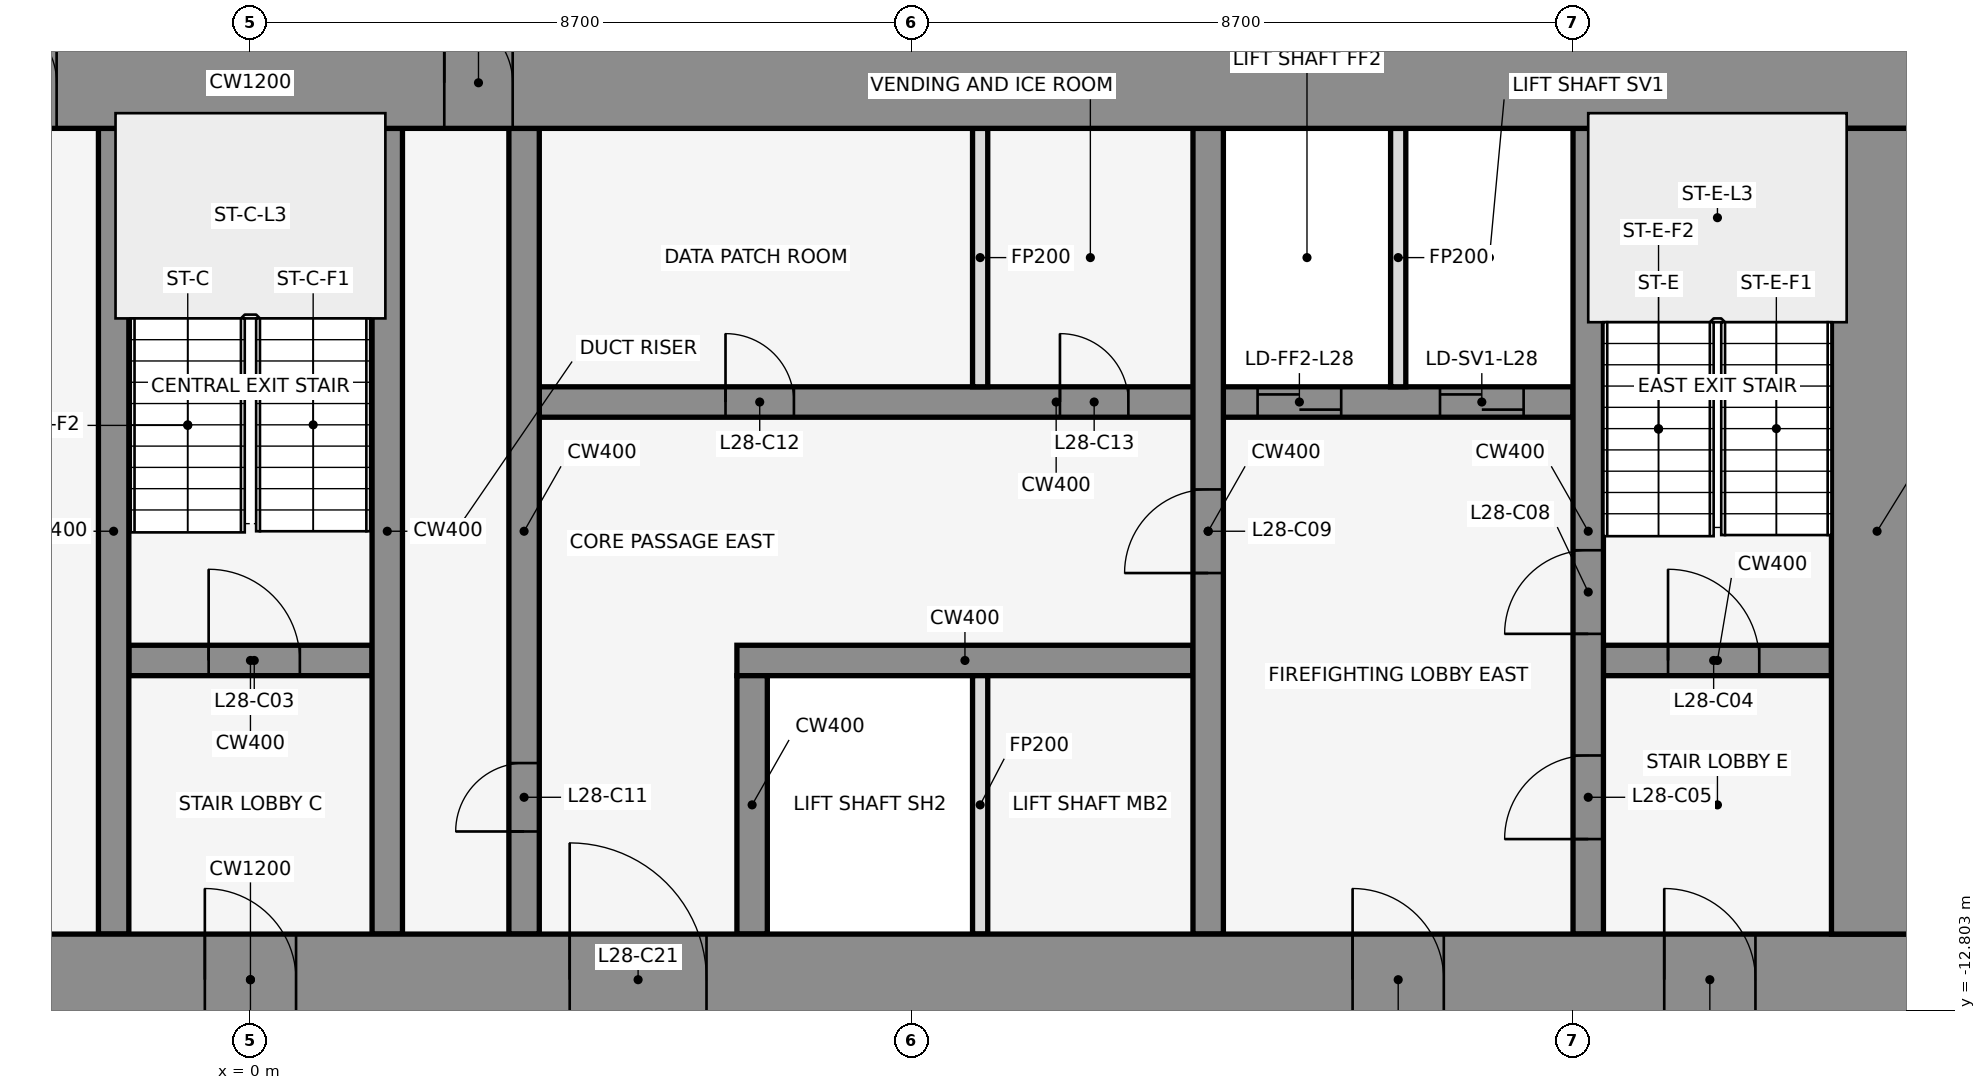
"""IFC4 building model, lengths in metres.
Left out: names, types, materials, properties, quantities, classifications, styles, units other than length and angle.
Written with IfcOpenShell. Run it as: python <this file> out.ifc"""

import sys

from ifc_helpers import new_model, si_unit, direction, frame, frame_2d, origin, place, context, subcontext, project, spatial, rectangle, extrude, element, fill, save


model = new_model("IFC4")
c1 = context("Model", 3, precision=1e-05, world=origin(), true_north=direction((0.0, 1.0)))
c2 = subcontext(c1, "Body", "Model", "MODEL_VIEW")
j1 = project(units=[si_unit("LENGTHUNIT", "METRE"), si_unit("PLANEANGLEUNIT", "RADIAN")], contexts=[c1])
p1 = place(None, origin())
s1 = spatial("IfcSite", under=j1, at=p1, CompositionType="ELEMENT")
p2 = place(p1, origin())
s2 = spatial("IfcBuilding", under=s1, at=p2, CompositionType="ELEMENT")
p3 = place(p2, frame((0.0, 0.0, 130.9)))
s3 = spatial("IfcBuildingStorey", under=s2, at=p3, CompositionType="ELEMENT", Elevation=130.9)
for number, where, z_axis, x_axis in (
    (1, (16.432, -0.105, 0.0), (0.0, 0.0, 1.0), (-0.84, 0.543, 0.0)),
    (2, (1.901, 1.08, 0.0), (0.0, 0.0, 1.0), (-0.84, -0.543, 0.0)),
    (3, (-0.068, -0.105, 0.0), (0.0, 0.0, 1.0), (-0.84, 0.543, 0.0)),
):
    element("IfcWall", number, at=place(p3, frame(where, z_axis=z_axis, x_axis=x_axis)), inside=s3, PredefinedType="STANDARD", context=c2, shape_type="SweptSolid", body=[
        extrude(rectangle(XDim=2.183, YDim=0.25, at=frame_2d((1.091, 0.0))), origin(), (0.0, 0.0, 1.0), 3.9),
    ])
p4 = place(p3, frame((-1.6, -8.2, 0.0), z_axis=(0.0, 0.0, 1.0), x_axis=(1.0, 0.0, 0.0)))
e4 = element("IfcWall", 4, at=p4, inside=s3, PredefinedType="SHEAR", context=c2, shape_type="SweptSolid", body=[
    extrude(rectangle(XDim=3.2, YDim=0.4, at=frame_2d((1.6, 0.0))), origin(), (0.0, 0.0, 1.0), 4.1),
])
p5 = place(p4, frame((1.05, 0.0, 0.0)))
e5 = element("IfcOpeningElement", 5, at=p5, cuts=e4, PredefinedType="OPENING", context=c2, shape_type="SweptSolid", body=[
    extrude(rectangle(XDim=1.2, YDim=2.1, at=frame_2d((0.6, 1.05))), frame((0.0, 0.212, 0.0), z_axis=(0.0, -1.0, 0.0), x_axis=(1.0, 0.0, 0.0)), (0.0, 0.0, 1.0), 0.424),
])
p6 = place(p3, frame((6.4, -8.2, 0.0), z_axis=(0.0, 0.0, 1.0), x_axis=(1.0, 0.0, 0.0)))
e6 = element("IfcWall", 6, at=p6, inside=s3, PredefinedType="SHEAR", context=c2, shape_type="SweptSolid", body=[
    extrude(rectangle(XDim=6.0, YDim=0.4, at=frame_2d((3.0, 0.0))), origin(), (0.0, 0.0, 1.0), 4.1),
])
p7 = place(p3, frame((17.8, -8.2, 0.0), z_axis=(0.0, 0.0, 1.0), x_axis=(1.0, 0.0, 0.0)))
e7 = element("IfcWall", 7, at=p7, inside=s3, PredefinedType="SHEAR", context=c2, shape_type="SweptSolid", body=[
    extrude(rectangle(XDim=3.0, YDim=0.4, at=frame_2d((1.5, 0.0))), origin(), (0.0, 0.0, 1.0), 4.1),
])
p8 = place(p7, frame((0.85, 0.0, 0.0)))
e8 = element("IfcOpeningElement", 8, at=p8, cuts=e7, PredefinedType="OPENING", context=c2, shape_type="SweptSolid", body=[
    extrude(rectangle(XDim=1.2, YDim=2.1, at=frame_2d((0.6, 1.05))), frame((0.0, 0.212, 0.0), z_axis=(0.0, -1.0, 0.0), x_axis=(1.0, 0.0, 0.0)), (0.0, 0.0, 1.0), 0.424),
])
p9 = place(p3, frame((3.8, -4.8, 0.0), z_axis=(0.0, 0.0, 1.0), x_axis=(1.0, 0.0, 0.0)))
e9 = element("IfcWall", 9, at=p9, inside=s3, PredefinedType="SHEAR", context=c2, shape_type="SweptSolid", body=[
    extrude(rectangle(XDim=13.6, YDim=0.4, at=frame_2d((6.8, 0.0))), origin(), (0.0, 0.0, 1.0), 4.1),
])
p10 = place(p9, frame((9.45, 0.0, 0.0)))
e10 = element("IfcOpeningElement", 10, at=p10, cuts=e9, PredefinedType="OPENING", context=c2, shape_type="SweptSolid", body=[
    extrude(rectangle(XDim=1.1, YDim=2.1, at=frame_2d((0.55, 1.05))), frame((0.0, 0.212, 0.0), z_axis=(0.0, -1.0, 0.0), x_axis=(1.0, 0.0, 0.0)), (0.0, 0.0, 1.0), 0.424),
])
p11 = place(p9, frame((11.85, 0.0, 0.0)))
e11 = element("IfcOpeningElement", 11, at=p11, cuts=e9, PredefinedType="OPENING", context=c2, shape_type="SweptSolid", body=[
    extrude(rectangle(XDim=1.1, YDim=2.1, at=frame_2d((0.55, 1.05))), frame((0.0, 0.212, 0.0), z_axis=(0.0, -1.0, 0.0), x_axis=(1.0, 0.0, 0.0)), (0.0, 0.0, 1.0), 0.424),
])
p12 = place(p9, frame((2.45, 0.0, 0.0)))
e12 = element("IfcOpeningElement", 12, at=p12, cuts=e9, PredefinedType="OPENING", context=c2, shape_type="SweptSolid", body=[
    extrude(rectangle(XDim=0.9, YDim=2.1, at=frame_2d((0.45, 1.05))), frame((0.0, 0.212, 0.0), z_axis=(0.0, -1.0, 0.0), x_axis=(1.0, 0.0, 0.0)), (0.0, 0.0, 1.0), 0.424),
])
p13 = place(p9, frame((6.85, 0.0, 0.0)))
e13 = element("IfcOpeningElement", 13, at=p13, cuts=e9, PredefinedType="OPENING", context=c2, shape_type="SweptSolid", body=[
    extrude(rectangle(XDim=0.9, YDim=2.1, at=frame_2d((0.45, 1.05))), frame((0.0, 0.212, 0.0), z_axis=(0.0, -1.0, 0.0), x_axis=(1.0, 0.0, 0.0)), (0.0, 0.0, 1.0), 0.424),
])
for number, where, z_axis, x_axis in (
    (14, (-1.8, -11.8, 0.0), (0.0, 0.0, 1.0), (0.0, 1.0, 0.0)),
    (15, (1.8, -11.8, 0.0), (0.0, 0.0, 1.0), (0.0, 1.0, 0.0)),
):
    element("IfcWall", number, at=place(p3, frame(where, z_axis=z_axis, x_axis=x_axis)), inside=s3, PredefinedType="SHEAR", context=c2, shape_type="SweptSolid", body=[
        extrude(rectangle(XDim=10.6, YDim=0.4, at=frame_2d((5.3, 0.0))), origin(), (0.0, 0.0, 1.0), 4.1),
    ])
p14 = place(p3, frame((3.6, -11.8, 0.0), z_axis=(0.0, 0.0, 1.0), x_axis=(0.0, 1.0, 0.0)))
e16 = element("IfcWall", 16, at=p14, inside=s3, PredefinedType="SHEAR", context=c2, shape_type="SweptSolid", body=[
    extrude(rectangle(XDim=10.6, YDim=0.4, at=frame_2d((5.3, 0.0))), origin(), (0.0, 0.0, 1.0), 4.1),
])
p15 = place(p14, frame((1.35, 0.0, 0.0)))
e17 = element("IfcOpeningElement", 17, at=p15, cuts=e16, PredefinedType="OPENING", context=c2, shape_type="SweptSolid", body=[
    extrude(rectangle(XDim=0.9, YDim=2.1, at=frame_2d((0.45, 1.05))), frame((0.0, 0.212, 0.0), z_axis=(0.0, -1.0, 0.0), x_axis=(1.0, 0.0, 0.0)), (0.0, 0.0, 1.0), 0.424),
])
p16 = place(p3, frame((6.6, -11.8, 0.0), z_axis=(0.0, 0.0, 1.0), x_axis=(0.0, 1.0, 0.0)))
e18 = element("IfcWall", 18, at=p16, inside=s3, PredefinedType="SHEAR", context=c2, shape_type="SweptSolid", body=[
    extrude(rectangle(XDim=3.4, YDim=0.4, at=frame_2d((1.7, 0.0))), origin(), (0.0, 0.0, 1.0), 4.1),
])
for number, where, z_axis, x_axis in (
    (19, (9.6, -11.8, 0.0), (0.0, 0.0, 1.0), (0.0, 1.0, 0.0)),
    (20, (9.6, -4.6, 0.0), (0.0, 0.0, 1.0), (0.0, 1.0, 0.0)),
):
    element("IfcWall", number, at=place(p3, frame(where, z_axis=z_axis, x_axis=x_axis)), inside=s3, PredefinedType="PARTITIONING", context=c2, shape_type="SweptSolid", body=[
        extrude(rectangle(XDim=3.4, YDim=0.2, at=frame_2d((1.7, 0.0))), origin(), (0.0, 0.0, 1.0), 2.968),
    ])
p17 = place(p3, frame((12.6, -11.8, 0.0), z_axis=(0.0, 0.0, 1.0), x_axis=(0.0, 1.0, 0.0)))
e21 = element("IfcWall", 21, at=p17, inside=s3, PredefinedType="SHEAR", context=c2, shape_type="SweptSolid", body=[
    extrude(rectangle(XDim=10.6, YDim=0.4, at=frame_2d((5.3, 0.0))), origin(), (0.0, 0.0, 1.0), 4.1),
])
p18 = place(p17, frame((4.75, 0.0, 0.0)))
e22 = element("IfcOpeningElement", 22, at=p18, cuts=e21, PredefinedType="OPENING", context=c2, shape_type="SweptSolid", body=[
    extrude(rectangle(XDim=1.1, YDim=2.1, at=frame_2d((0.55, 1.05))), frame((0.0, 0.212, 0.0), z_axis=(0.0, -1.0, 0.0), x_axis=(1.0, 0.0, 0.0)), (0.0, 0.0, 1.0), 0.424),
])
p19 = place(p3, frame((15.1, -4.6, 0.0), z_axis=(0.0, 0.0, 1.0), x_axis=(0.0, 1.0, 0.0)))
e23 = element("IfcWall", 23, at=p19, inside=s3, PredefinedType="PARTITIONING", context=c2, shape_type="SweptSolid", body=[
    extrude(rectangle(XDim=3.4, YDim=0.2, at=frame_2d((1.7, 0.0))), origin(), (0.0, 0.0, 1.0), 2.968),
])
p20 = place(p3, frame((17.6, -11.8, 0.0), z_axis=(0.0, 0.0, 1.0), x_axis=(0.0, 1.0, 0.0)))
e24 = element("IfcWall", 24, at=p20, inside=s3, PredefinedType="SHEAR", context=c2, shape_type="SweptSolid", body=[
    extrude(rectangle(XDim=10.6, YDim=0.4, at=frame_2d((5.3, 0.0))), origin(), (0.0, 0.0, 1.0), 4.1),
])
p21 = place(p20, frame((1.25, 0.0, 0.0)))
e25 = element("IfcOpeningElement", 25, at=p21, cuts=e24, PredefinedType="OPENING", context=c2, shape_type="SweptSolid", body=[
    extrude(rectangle(XDim=1.1, YDim=2.1, at=frame_2d((0.55, 1.05))), frame((0.0, 0.212, 0.0), z_axis=(0.0, -1.0, 0.0), x_axis=(1.0, 0.0, 0.0)), (0.0, 0.0, 1.0), 0.424),
])
p22 = place(p20, frame((3.95, 0.0, 0.0)))
e26 = element("IfcOpeningElement", 26, at=p22, cuts=e24, PredefinedType="OPENING", context=c2, shape_type="SweptSolid", body=[
    extrude(rectangle(XDim=1.1, YDim=2.1, at=frame_2d((0.55, 1.05))), frame((0.0, 0.212, 0.0), z_axis=(0.0, -1.0, 0.0), x_axis=(1.0, 0.0, 0.0)), (0.0, 0.0, 1.0), 0.424),
])
p23 = place(p3, frame((-22.0, -0.6, 0.0), z_axis=(0.0, 0.0, 1.0), x_axis=(1.0, 0.0, 0.0)))
e27 = element("IfcWall", 27, at=p23, inside=s3, PredefinedType="SHEAR", context=c2, shape_type="SweptSolid", body=[
    extrude(rectangle(XDim=44.0, YDim=1.2, at=frame_2d((22.0, 0.0))), origin(), (0.0, 0.0, 1.0), 4.1),
])
p24 = place(p23, frame((18.55, 0.0, 0.0)))
e28 = element("IfcOpeningElement", 28, at=p24, cuts=e27, PredefinedType="OPENING", context=c2, shape_type="SweptSolid", body=[
    extrude(rectangle(XDim=0.9, YDim=2.1, at=frame_2d((0.45, 1.05))), frame((0.0, 0.612, 0.0), z_axis=(0.0, -1.0, 0.0), x_axis=(1.0, 0.0, 0.0)), (0.0, 0.0, 1.0), 1.224),
])
p25 = place(p23, frame((24.55, 0.0, 0.0)))
e29 = element("IfcOpeningElement", 29, at=p25, cuts=e27, PredefinedType="OPENING", context=c2, shape_type="SweptSolid", body=[
    extrude(rectangle(XDim=0.9, YDim=2.1, at=frame_2d((0.45, 1.05))), frame((0.0, 0.612, 0.0), z_axis=(0.0, -1.0, 0.0), x_axis=(1.0, 0.0, 0.0)), (0.0, 0.0, 1.0), 1.224),
])
p26 = place(p3, frame((-22.0, -12.4, 0.0), z_axis=(0.0, 0.0, 1.0), x_axis=(1.0, 0.0, 0.0)))
e30 = element("IfcWall", 30, at=p26, inside=s3, PredefinedType="SHEAR", context=c2, shape_type="SweptSolid", body=[
    extrude(rectangle(XDim=44.0, YDim=1.2, at=frame_2d((22.0, 0.0))), origin(), (0.0, 0.0, 1.0), 4.1),
])
p27 = place(p26, frame((2.2, 0.0, 0.0)))
e31 = element("IfcOpeningElement", 31, at=p27, cuts=e30, PredefinedType="OPENING", context=c2, shape_type="SweptSolid", body=[
    extrude(rectangle(XDim=1.2, YDim=2.1, at=frame_2d((0.6, 1.05))), frame((0.0, 0.612, 0.0), z_axis=(0.0, -1.0, 0.0), x_axis=(1.0, 0.0, 0.0)), (0.0, 0.0, 1.0), 1.224),
])
p28 = place(p26, frame((21.4, 0.0, 0.0)))
e32 = element("IfcOpeningElement", 32, at=p28, cuts=e30, PredefinedType="OPENING", context=c2, shape_type="SweptSolid", body=[
    extrude(rectangle(XDim=1.2, YDim=2.1, at=frame_2d((0.6, 1.05))), frame((0.0, 0.612, 0.0), z_axis=(0.0, -1.0, 0.0), x_axis=(1.0, 0.0, 0.0)), (0.0, 0.0, 1.0), 1.224),
])
p29 = place(p26, frame((40.6, 0.0, 0.0)))
e33 = element("IfcOpeningElement", 33, at=p29, cuts=e30, PredefinedType="OPENING", context=c2, shape_type="SweptSolid", body=[
    extrude(rectangle(XDim=1.2, YDim=2.1, at=frame_2d((0.6, 1.05))), frame((0.0, 0.612, 0.0), z_axis=(0.0, -1.0, 0.0), x_axis=(1.0, 0.0, 0.0)), (0.0, 0.0, 1.0), 1.224),
])
p30 = place(p26, frame((16.0, 0.0, 0.0)))
e34 = element("IfcOpeningElement", 34, at=p30, cuts=e30, PredefinedType="OPENING", context=c2, shape_type="SweptSolid", body=[
    extrude(rectangle(XDim=1.8, YDim=2.1, at=frame_2d((0.9, 1.05))), frame((0.0, 0.612, 0.0), z_axis=(0.0, -1.0, 0.0), x_axis=(1.0, 0.0, 0.0)), (0.0, 0.0, 1.0), 1.224),
])
p31 = place(p26, frame((6.3, 0.0, 0.0)))
e35 = element("IfcOpeningElement", 35, at=p31, cuts=e30, PredefinedType="OPENING", context=c2, shape_type="SweptSolid", body=[
    extrude(rectangle(XDim=1.2, YDim=2.1, at=frame_2d((0.6, 1.05))), frame((0.0, 0.612, 0.0), z_axis=(0.0, -1.0, 0.0), x_axis=(1.0, 0.0, 0.0)), (0.0, 0.0, 1.0), 1.224),
])
p32 = place(p26, frame((26.2, 0.0, 0.0)))
e36 = element("IfcOpeningElement", 36, at=p32, cuts=e30, PredefinedType="OPENING", context=c2, shape_type="SweptSolid", body=[
    extrude(rectangle(XDim=1.8, YDim=2.1, at=frame_2d((0.9, 1.05))), frame((0.0, 0.612, 0.0), z_axis=(0.0, -1.0, 0.0), x_axis=(1.0, 0.0, 0.0)), (0.0, 0.0, 1.0), 1.224),
])
p33 = place(p26, frame((36.5, 0.0, 0.0)))
e37 = element("IfcOpeningElement", 37, at=p33, cuts=e30, PredefinedType="OPENING", context=c2, shape_type="SweptSolid", body=[
    extrude(rectangle(XDim=1.2, YDim=2.1, at=frame_2d((0.6, 1.05))), frame((0.0, 0.612, 0.0), z_axis=(0.0, -1.0, 0.0), x_axis=(1.0, 0.0, 0.0)), (0.0, 0.0, 1.0), 1.224),
])
p34 = place(p3, frame((21.4, -11.8, 0.0), z_axis=(0.0, 0.0, 1.0), x_axis=(0.0, 1.0, 0.0)))
e38 = element("IfcWall", 38, at=p34, inside=s3, PredefinedType="SHEAR", context=c2, shape_type="SweptSolid", body=[
    extrude(rectangle(XDim=10.6, YDim=1.2, at=frame_2d((5.3, 0.0))), origin(), (0.0, 0.0, 1.0), 4.1),
])
p35 = place(p5, origin())
e39 = element("IfcDoor", 39, at=p35, inside=s3, OperationType="SINGLE_SWING_LEFT", PredefinedType="DOOR", context=c2, shape_type="SweptSolid", body=[
    extrude(rectangle(XDim=1.2, YDim=2.1, at=frame_2d((0.6, 1.05))), frame((0.0, 0.025, 0.0), z_axis=(0.0, -1.0, 0.0), x_axis=(1.0, 0.0, 0.0)), (0.0, 0.0, 1.0), 0.05),
])
fill(e5, e39)
p36 = place(p8, origin())
e40 = element("IfcDoor", 40, at=p36, inside=s3, OperationType="SINGLE_SWING_RIGHT", PredefinedType="DOOR", context=c2, shape_type="SweptSolid", body=[
    extrude(rectangle(XDim=1.2, YDim=2.1, at=frame_2d((0.6, 1.05))), frame((0.0, 0.025, 0.0), z_axis=(0.0, -1.0, 0.0), x_axis=(1.0, 0.0, 0.0)), (0.0, 0.0, 1.0), 0.05),
])
fill(e8, e40)
p37 = place(p21, origin())
e41 = element("IfcDoor", 41, at=p37, inside=s3, OperationType="SINGLE_SWING_LEFT", PredefinedType="DOOR", context=c2, shape_type="SweptSolid", body=[
    extrude(rectangle(XDim=1.1, YDim=2.1, at=frame_2d((0.55, 1.05))), frame((0.0, 0.025, 0.0), z_axis=(0.0, -1.0, 0.0), x_axis=(1.0, 0.0, 0.0)), (0.0, 0.0, 1.0), 0.05),
])
fill(e25, e41)
p38 = place(p10, origin())
e42 = element("IfcDoor", 42, at=p38, inside=s3, OperationType="DOUBLE_DOOR_SLIDING", PredefinedType="DOOR", context=c2, shape_type="SweptSolid", body=[
    extrude(rectangle(XDim=1.1, YDim=2.1, at=frame_2d((0.55, 1.05))), frame((0.0, 0.025, 0.0), z_axis=(0.0, -1.0, 0.0), x_axis=(1.0, 0.0, 0.0)), (0.0, 0.0, 1.0), 0.05),
])
fill(e10, e42)
p39 = place(p11, origin())
e43 = element("IfcDoor", 43, at=p39, inside=s3, OperationType="DOUBLE_DOOR_SLIDING", PredefinedType="DOOR", context=c2, shape_type="SweptSolid", body=[
    extrude(rectangle(XDim=1.1, YDim=2.1, at=frame_2d((0.55, 1.05))), frame((0.0, 0.025, 0.0), z_axis=(0.0, -1.0, 0.0), x_axis=(1.0, 0.0, 0.0)), (0.0, 0.0, 1.0), 0.05),
])
fill(e11, e43)
p40 = place(p22, origin())
e44 = element("IfcDoor", 44, at=p40, inside=s3, OperationType="SINGLE_SWING_RIGHT", PredefinedType="DOOR", context=c2, shape_type="SweptSolid", body=[
    extrude(rectangle(XDim=1.1, YDim=2.1, at=frame_2d((0.55, 1.05))), frame((0.0, 0.025, 0.0), z_axis=(0.0, -1.0, 0.0), x_axis=(1.0, 0.0, 0.0)), (0.0, 0.0, 1.0), 0.05),
])
fill(e26, e44)
p41 = place(p18, frame((1.1, 0.0, 0.0), z_axis=(0.0, 0.0, 1.0), x_axis=(-1.0, 0.0, 0.0)))
e45 = element("IfcDoor", 45, at=p41, inside=s3, OperationType="SINGLE_SWING_RIGHT", PredefinedType="DOOR", context=c2, shape_type="SweptSolid", body=[
    extrude(rectangle(XDim=1.1, YDim=2.1, at=frame_2d((0.55, 1.05))), frame((0.0, 0.025, 0.0), z_axis=(0.0, -1.0, 0.0), x_axis=(1.0, 0.0, 0.0)), (0.0, 0.0, 1.0), 0.05),
])
fill(e22, e45)
p42 = place(p15, origin())
e46 = element("IfcDoor", 46, at=p42, inside=s3, OperationType="SINGLE_SWING_LEFT", PredefinedType="DOOR", context=c2, shape_type="SweptSolid", body=[
    extrude(rectangle(XDim=0.9, YDim=2.1, at=frame_2d((0.45, 1.05))), frame((0.0, 0.025, 0.0), z_axis=(0.0, -1.0, 0.0), x_axis=(1.0, 0.0, 0.0)), (0.0, 0.0, 1.0), 0.05),
])
fill(e17, e46)
p43 = place(p12, origin())
e47 = element("IfcDoor", 47, at=p43, inside=s3, OperationType="SINGLE_SWING_RIGHT", PredefinedType="DOOR", context=c2, shape_type="SweptSolid", body=[
    extrude(rectangle(XDim=0.9, YDim=2.1, at=frame_2d((0.45, 1.05))), frame((0.0, 0.025, 0.0), z_axis=(0.0, -1.0, 0.0), x_axis=(1.0, 0.0, 0.0)), (0.0, 0.0, 1.0), 0.05),
])
fill(e12, e47)
p44 = place(p13, origin())
e48 = element("IfcDoor", 48, at=p44, inside=s3, OperationType="SINGLE_SWING_LEFT", PredefinedType="DOOR", context=c2, shape_type="SweptSolid", body=[
    extrude(rectangle(XDim=0.9, YDim=2.1, at=frame_2d((0.45, 1.05))), frame((0.0, 0.025, 0.0), z_axis=(0.0, -1.0, 0.0), x_axis=(1.0, 0.0, 0.0)), (0.0, 0.0, 1.0), 0.05),
])
fill(e13, e48)
p45 = place(p24, origin())
e49 = element("IfcDoor", 49, at=p45, inside=s3, OperationType="SINGLE_SWING_LEFT", PredefinedType="DOOR", context=c2, shape_type="SweptSolid", body=[
    extrude(rectangle(XDim=0.9, YDim=2.1, at=frame_2d((0.45, 1.05))), frame((0.0, 0.025, 0.0), z_axis=(0.0, -1.0, 0.0), x_axis=(1.0, 0.0, 0.0)), (0.0, 0.0, 1.0), 0.05),
])
fill(e28, e49)
p46 = place(p25, origin())
e50 = element("IfcDoor", 50, at=p46, inside=s3, OperationType="SINGLE_SWING_LEFT", PredefinedType="DOOR", context=c2, shape_type="SweptSolid", body=[
    extrude(rectangle(XDim=0.9, YDim=2.1, at=frame_2d((0.45, 1.05))), frame((0.0, 0.025, 0.0), z_axis=(0.0, -1.0, 0.0), x_axis=(1.0, 0.0, 0.0)), (0.0, 0.0, 1.0), 0.05),
])
fill(e29, e50)
p47 = place(p28, frame((1.2, 0.0, 0.0), z_axis=(0.0, 0.0, 1.0), x_axis=(-1.0, 0.0, 0.0)))
e51 = element("IfcDoor", 51, at=p47, inside=s3, OperationType="SINGLE_SWING_RIGHT", PredefinedType="DOOR", context=c2, shape_type="SweptSolid", body=[
    extrude(rectangle(XDim=1.2, YDim=2.1, at=frame_2d((0.6, 1.05))), frame((0.0, 0.025, 0.0), z_axis=(0.0, -1.0, 0.0), x_axis=(1.0, 0.0, 0.0)), (0.0, 0.0, 1.0), 0.05),
])
fill(e32, e51)
p48 = place(p29, frame((1.2, 0.0, 0.0), z_axis=(0.0, 0.0, 1.0), x_axis=(-1.0, 0.0, 0.0)))
e52 = element("IfcDoor", 52, at=p48, inside=s3, OperationType="SINGLE_SWING_RIGHT", PredefinedType="DOOR", context=c2, shape_type="SweptSolid", body=[
    extrude(rectangle(XDim=1.2, YDim=2.1, at=frame_2d((0.6, 1.05))), frame((0.0, 0.025, 0.0), z_axis=(0.0, -1.0, 0.0), x_axis=(1.0, 0.0, 0.0)), (0.0, 0.0, 1.0), 0.05),
])
fill(e33, e52)
p49 = place(p32, origin())
e53 = element("IfcDoor", 53, at=p49, inside=s3, OperationType="SINGLE_SWING_LEFT", PredefinedType="DOOR", context=c2, shape_type="SweptSolid", body=[
    extrude(rectangle(XDim=1.8, YDim=2.1, at=frame_2d((0.9, 1.05))), frame((0.0, 0.025, 0.0), z_axis=(0.0, -1.0, 0.0), x_axis=(1.0, 0.0, 0.0)), (0.0, 0.0, 1.0), 0.05),
])
fill(e36, e53)
p50 = place(p33, frame((1.2, 0.0, 0.0), z_axis=(0.0, 0.0, 1.0), x_axis=(-1.0, 0.0, 0.0)))
e54 = element("IfcDoor", 54, at=p50, inside=s3, OperationType="SINGLE_SWING_RIGHT", PredefinedType="DOOR", context=c2, shape_type="SweptSolid", body=[
    extrude(rectangle(XDim=1.2, YDim=2.1, at=frame_2d((0.6, 1.05))), frame((0.0, 0.025, 0.0), z_axis=(0.0, -1.0, 0.0), x_axis=(1.0, 0.0, 0.0)), (0.0, 0.0, 1.0), 0.05),
])
fill(e37, e54)
save(model, sys.argv[1])
